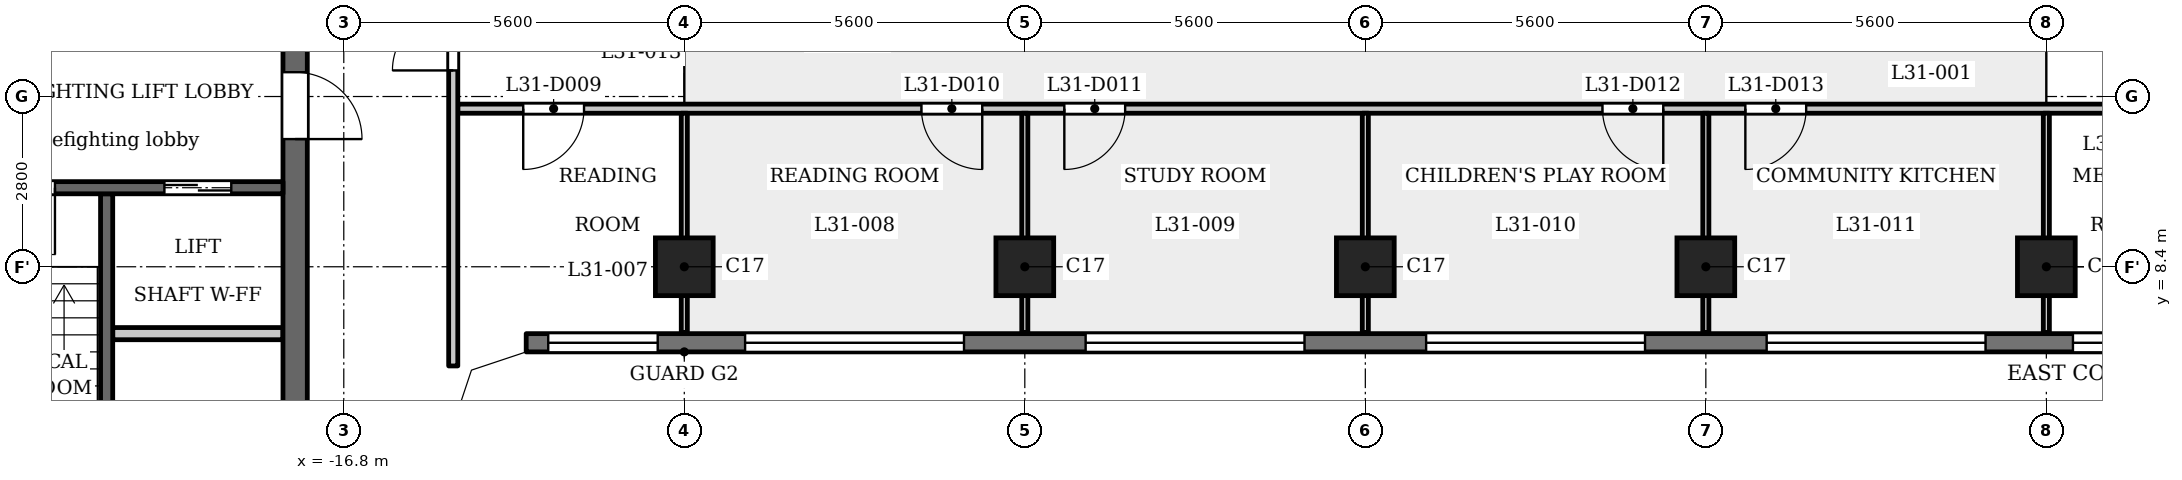
"""IFC4 building model, lengths in metres.
Left out: names, types, materials, properties, quantities, classifications, styles, units other than length and angle.
Written with IfcOpenShell. Run it as: python <this file> out.ifc"""

import sys

from ifc_helpers import new_model, si_unit, direction, frame, frame_2d, origin, origin_2d, place, context, subcontext, project, spatial, polyline, rectangle, outline, extrude, element, fill, save


model = new_model("IFC4")
c1 = context("Model", 3, precision=1e-05, world=origin(), true_north=direction((0.0, 1.0)))
c2 = subcontext(c1, "Body", "Model", "MODEL_VIEW")
j1 = project(units=[si_unit("LENGTHUNIT", "METRE"), si_unit("PLANEANGLEUNIT", "RADIAN")], contexts=[c1])
p1 = place(None, origin())
s1 = spatial("IfcSite", under=j1, at=p1, CompositionType="ELEMENT")
p2 = place(p1, origin())
s2 = spatial("IfcBuilding", under=s1, at=p2, CompositionType="ELEMENT")
p3 = place(p2, frame((0.0, 0.0, 121.8)))
s3 = spatial("IfcBuildingStorey", under=s2, at=p3, CompositionType="ELEMENT", Elevation=121.8)
for number, where, z_axis, x_axis in (
    (1, (-11.2, 8.4, 0.0), (0.0, 0.0, 1.0), (1.0, 0.0, 0.0)),
    (2, (-5.6, 8.4, 0.0), (0.0, 0.0, 1.0), (1.0, 0.0, 0.0)),
    (3, (0.0, 8.4, 0.0), (0.0, 0.0, 1.0), (1.0, 0.0, 0.0)),
    (4, (5.6, 8.4, 0.0), (0.0, 0.0, 1.0), (1.0, 0.0, 0.0)),
    (5, (11.2, 8.4, 0.0), (0.0, 0.0, 1.0), (1.0, 0.0, 0.0)),
):
    element("IfcColumn", number, at=place(p3, frame(where, z_axis=z_axis, x_axis=x_axis)), inside=s3, PredefinedType="COLUMN", context=c2, shape_type="SweptSolid", body=[
        extrude(rectangle(XDim=0.95, YDim=0.95, at=origin_2d()), origin(), (0.0, 0.0, 1.0), 3.5),
    ])
p4 = place(p3, frame((-13.8, 7.15, 0.0), z_axis=(0.0, 0.0, 1.0), x_axis=(1.0, 0.0, 0.0)))
e6 = element("IfcWall", 6, at=p4, inside=s3, PredefinedType="SOLIDWALL", context=c2, shape_type="SweptSolid", body=[
    extrude(rectangle(XDim=27.6, YDim=0.3, at=frame_2d((13.8, 0.0))), origin(), (0.0, 0.0, 1.0), 3.15),
])
p5 = place(p4, frame((0.363, 0.0, 0.9)))
e7 = element("IfcOpeningElement", 7, at=p5, cuts=e6, PredefinedType="OPENING", context=c2, shape_type="SweptSolid", body=[
    extrude(rectangle(XDim=1.8, YDim=1.25, at=frame_2d((0.9, 0.625))), frame((0.0, 0.16, 0.0), z_axis=(0.0, -1.0, 0.0), x_axis=(1.0, 0.0, 0.0)), (0.0, 0.0, 1.0), 0.32),
])
p6 = place(p4, frame((3.6, 0.0, 1.2)))
e8 = element("IfcOpeningElement", 8, at=p6, cuts=e6, PredefinedType="OPENING", context=c2, shape_type="SweptSolid", body=[
    extrude(rectangle(XDim=3.6, YDim=0.95, at=frame_2d((1.8, 0.475))), frame((0.0, 0.16, 0.0), z_axis=(0.0, -1.0, 0.0), x_axis=(1.0, 0.0, 0.0)), (0.0, 0.0, 1.0), 0.32),
])
p7 = place(p4, frame((9.2, 0.0, 1.2)))
e9 = element("IfcOpeningElement", 9, at=p7, cuts=e6, PredefinedType="OPENING", context=c2, shape_type="SweptSolid", body=[
    extrude(rectangle(XDim=3.6, YDim=0.95, at=frame_2d((1.8, 0.475))), frame((0.0, 0.16, 0.0), z_axis=(0.0, -1.0, 0.0), x_axis=(1.0, 0.0, 0.0)), (0.0, 0.0, 1.0), 0.32),
])
p8 = place(p4, frame((14.8, 0.0, 1.2)))
e10 = element("IfcOpeningElement", 10, at=p8, cuts=e6, PredefinedType="OPENING", context=c2, shape_type="SweptSolid", body=[
    extrude(rectangle(XDim=3.6, YDim=0.95, at=frame_2d((1.8, 0.475))), frame((0.0, 0.16, 0.0), z_axis=(0.0, -1.0, 0.0), x_axis=(1.0, 0.0, 0.0)), (0.0, 0.0, 1.0), 0.32),
])
p9 = place(p4, frame((20.4, 0.0, 1.2)))
e11 = element("IfcOpeningElement", 11, at=p9, cuts=e6, PredefinedType="OPENING", context=c2, shape_type="SweptSolid", body=[
    extrude(rectangle(XDim=3.6, YDim=0.95, at=frame_2d((1.8, 0.475))), frame((0.0, 0.16, 0.0), z_axis=(0.0, -1.0, 0.0), x_axis=(1.0, 0.0, 0.0)), (0.0, 0.0, 1.0), 0.32),
])
p10 = place(p4, frame((25.438, 0.0, 0.9)))
e12 = element("IfcOpeningElement", 12, at=p10, cuts=e6, PredefinedType="OPENING", context=c2, shape_type="SweptSolid", body=[
    extrude(rectangle(XDim=1.8, YDim=1.25, at=frame_2d((0.9, 0.625))), frame((0.0, 0.16, 0.0), z_axis=(0.0, -1.0, 0.0), x_axis=(1.0, 0.0, 0.0)), (0.0, 0.0, 1.0), 0.32),
])
p11 = place(p3, frame((-20.7, 2.6, 0.0), z_axis=(0.0, 0.0, 1.0), x_axis=(0.0, 1.0, 0.0)))
e13 = element("IfcWall", 13, at=p11, inside=s3, PredefinedType="SHEAR", context=c2, shape_type="SweptSolid", body=[
    extrude(rectangle(XDim=7.0, YDim=0.2, at=frame_2d((3.5, 0.0))), origin(), (0.0, 0.0, 1.0), 3.15),
])
p12 = place(p3, frame((-17.6, -12.3, 0.0), z_axis=(0.0, 0.0, 1.0), x_axis=(0.0, 1.0, 0.0)))
e14 = element("IfcWall", 14, at=p12, inside=s3, PredefinedType="SHEAR", context=c2, shape_type="SweptSolid", body=[
    extrude(rectangle(XDim=24.6, YDim=0.4, at=frame_2d((12.3, 0.0))), origin(), (0.0, 0.0, 1.0), 3.15),
])
p13 = place(p12, frame((6.0, 0.0, 0.0)))
e15 = element("IfcOpeningElement", 15, at=p13, cuts=e14, PredefinedType="OPENING", context=c2, shape_type="SweptSolid", body=[
    extrude(rectangle(XDim=1.1, YDim=2.1, at=frame_2d((0.55, 1.05))), frame((0.0, 0.21, 0.0), z_axis=(0.0, -1.0, 0.0), x_axis=(1.0, 0.0, 0.0)), (0.0, 0.0, 1.0), 0.42),
])
p14 = place(p12, frame((8.4, 0.0, 0.0)))
e16 = element("IfcOpeningElement", 16, at=p14, cuts=e14, PredefinedType="OPENING", context=c2, shape_type="SweptSolid", body=[
    extrude(rectangle(XDim=1.1, YDim=2.1, at=frame_2d((0.55, 1.05))), frame((0.0, 0.21, 0.0), z_axis=(0.0, -1.0, 0.0), x_axis=(1.0, 0.0, 0.0)), (0.0, 0.0, 1.0), 0.42),
])
p15 = place(p12, frame((10.8, 0.0, 0.0)))
e17 = element("IfcOpeningElement", 17, at=p15, cuts=e14, PredefinedType="OPENING", context=c2, shape_type="SweptSolid", body=[
    extrude(rectangle(XDim=1.1, YDim=2.1, at=frame_2d((0.55, 1.05))), frame((0.0, 0.21, 0.0), z_axis=(0.0, -1.0, 0.0), x_axis=(1.0, 0.0, 0.0)), (0.0, 0.0, 1.0), 0.42),
])
p16 = place(p12, frame((22.8, 0.0, 0.0)))
e18 = element("IfcOpeningElement", 18, at=p16, cuts=e14, PredefinedType="OPENING", context=c2, shape_type="SweptSolid", body=[
    extrude(rectangle(XDim=1.1, YDim=2.1, at=frame_2d((0.55, 1.05))), frame((0.0, 0.21, 0.0), z_axis=(0.0, -1.0, 0.0), x_axis=(1.0, 0.0, 0.0)), (0.0, 0.0, 1.0), 0.42),
])
p17 = place(p12, frame((0.7, 0.0, 0.0)))
e19 = element("IfcOpeningElement", 19, at=p17, cuts=e14, PredefinedType="OPENING", context=c2, shape_type="SweptSolid", body=[
    extrude(rectangle(XDim=1.1, YDim=2.1, at=frame_2d((0.55, 1.05))), frame((0.0, 0.21, 0.0), z_axis=(0.0, -1.0, 0.0), x_axis=(1.0, 0.0, 0.0)), (0.0, 0.0, 1.0), 0.42),
])
p18 = place(p12, frame((12.775, 0.0, 0.0)))
e20 = element("IfcOpeningElement", 20, at=p18, cuts=e14, PredefinedType="OPENING", context=c2, shape_type="SweptSolid", body=[
    extrude(rectangle(XDim=1.8, YDim=2.1, at=frame_2d((0.9, 1.05))), frame((0.0, 0.21, 0.0), z_axis=(0.0, -1.0, 0.0), x_axis=(1.0, 0.0, 0.0)), (0.0, 0.0, 1.0), 0.42),
])
p19 = place(p3, frame((-17.8, 7.3, 0.0), z_axis=(0.0, 0.0, 1.0), x_axis=(-1.0, 0.0, 0.0)))
e21 = element("IfcWall", 21, at=p19, inside=s3, PredefinedType="PARTITIONING", context=c2, shape_type="SweptSolid", body=[
    extrude(rectangle(XDim=2.8, YDim=0.2, at=frame_2d((1.4, 0.0))), origin(), (0.0, 0.0, 1.0), 3.15),
])
p20 = place(p3, frame((-17.8, 9.7, 0.0), z_axis=(0.0, 0.0, 1.0), x_axis=(-1.0, 0.0, 0.0)))
e22 = element("IfcWall", 22, at=p20, inside=s3, PredefinedType="SHEAR", context=c2, shape_type="SweptSolid", body=[
    extrude(rectangle(XDim=8.3, YDim=0.2, at=frame_2d((4.15, 0.0))), origin(), (0.0, 0.0, 1.0), 3.15),
])
p21 = place(p20, frame((0.85, 0.0, 0.0)))
e23 = element("IfcOpeningElement", 23, at=p21, cuts=e22, PredefinedType="OPENING", context=c2, shape_type="SweptSolid", body=[
    extrude(rectangle(XDim=1.1, YDim=2.1, at=frame_2d((0.55, 1.05))), frame((0.0, 0.11, 0.0), z_axis=(0.0, -1.0, 0.0), x_axis=(1.0, 0.0, 0.0)), (0.0, 0.0, 1.0), 0.22),
])
p22 = place(p20, frame((3.75, 0.0, 0.0)))
e24 = element("IfcOpeningElement", 24, at=p22, cuts=e22, PredefinedType="OPENING", context=c2, shape_type="SweptSolid", body=[
    extrude(rectangle(XDim=1.1, YDim=2.1, at=frame_2d((0.55, 1.05))), frame((0.0, 0.11, 0.0), z_axis=(0.0, -1.0, 0.0), x_axis=(1.0, 0.0, 0.0)), (0.0, 0.0, 1.0), 0.22),
])
p23 = place(p3, frame((-14.925, 11.0, 0.0), z_axis=(0.0, 0.0, 1.0), x_axis=(1.0, 0.0, 0.0)))
e25 = element("IfcWall", 25, at=p23, inside=s3, PredefinedType="PARTITIONING", context=c2, shape_type="SweptSolid", body=[
    extrude(rectangle(XDim=29.85, YDim=0.15, at=frame_2d((14.925, 0.0))), origin(), (0.0, 0.0, 1.0), 3.15),
])
p24 = place(p23, frame((1.076, 0.0, 0.0)))
e26 = element("IfcOpeningElement", 26, at=p24, cuts=e25, PredefinedType="OPENING", context=c2, shape_type="SweptSolid", body=[
    extrude(rectangle(XDim=1.0, YDim=2.1, at=frame_2d((0.5, 1.05))), frame((0.0, 0.085, 0.0), z_axis=(0.0, -1.0, 0.0), x_axis=(1.0, 0.0, 0.0)), (0.0, 0.0, 1.0), 0.17),
])
p25 = place(p23, frame((7.625, 0.0, 0.0)))
e27 = element("IfcOpeningElement", 27, at=p25, cuts=e25, PredefinedType="OPENING", context=c2, shape_type="SweptSolid", body=[
    extrude(rectangle(XDim=1.0, YDim=2.1, at=frame_2d((0.5, 1.05))), frame((0.0, 0.085, 0.0), z_axis=(0.0, -1.0, 0.0), x_axis=(1.0, 0.0, 0.0)), (0.0, 0.0, 1.0), 0.17),
])
p26 = place(p23, frame((9.975, 0.0, 0.0)))
e28 = element("IfcOpeningElement", 28, at=p26, cuts=e25, PredefinedType="OPENING", context=c2, shape_type="SweptSolid", body=[
    extrude(rectangle(XDim=1.0, YDim=2.1, at=frame_2d((0.5, 1.05))), frame((0.0, 0.085, 0.0), z_axis=(0.0, -1.0, 0.0), x_axis=(1.0, 0.0, 0.0)), (0.0, 0.0, 1.0), 0.17),
])
p27 = place(p23, frame((18.825, 0.0, 0.0)))
e29 = element("IfcOpeningElement", 29, at=p27, cuts=e25, PredefinedType="OPENING", context=c2, shape_type="SweptSolid", body=[
    extrude(rectangle(XDim=1.0, YDim=2.1, at=frame_2d((0.5, 1.05))), frame((0.0, 0.085, 0.0), z_axis=(0.0, -1.0, 0.0), x_axis=(1.0, 0.0, 0.0)), (0.0, 0.0, 1.0), 0.17),
])
p28 = place(p23, frame((21.175, 0.0, 0.0)))
e30 = element("IfcOpeningElement", 30, at=p28, cuts=e25, PredefinedType="OPENING", context=c2, shape_type="SweptSolid", body=[
    extrude(rectangle(XDim=1.0, YDim=2.1, at=frame_2d((0.5, 1.05))), frame((0.0, 0.085, 0.0), z_axis=(0.0, -1.0, 0.0), x_axis=(1.0, 0.0, 0.0)), (0.0, 0.0, 1.0), 0.17),
])
p29 = place(p23, frame((27.775, 0.0, 0.0)))
e31 = element("IfcOpeningElement", 31, at=p29, cuts=e25, PredefinedType="OPENING", context=c2, shape_type="SweptSolid", body=[
    extrude(rectangle(XDim=1.0, YDim=2.1, at=frame_2d((0.5, 1.05))), frame((0.0, 0.085, 0.0), z_axis=(0.0, -1.0, 0.0), x_axis=(1.0, 0.0, 0.0)), (0.0, 0.0, 1.0), 0.17),
])
p30 = place(p3, frame((-15.0, 6.769, 0.0), z_axis=(0.0, 0.0, 1.0), x_axis=(0.0, 1.0, 0.0)))
e32 = element("IfcWall", 32, at=p30, inside=s3, PredefinedType="PARTITIONING", context=c2, shape_type="SweptSolid", body=[
    extrude(rectangle(XDim=6.356, YDim=0.15, at=frame_2d((3.178, 0.0))), origin(), (0.0, 0.0, 1.0), 3.15),
])
p31 = place(p30, frame((4.86, 0.0, 0.0)))
e33 = element("IfcOpeningElement", 33, at=p31, cuts=e32, PredefinedType="OPENING", context=c2, shape_type="SweptSolid", body=[
    extrude(rectangle(XDim=1.0, YDim=2.1, at=frame_2d((0.5, 1.05))), frame((0.0, 0.085, 0.0), z_axis=(0.0, -1.0, 0.0), x_axis=(1.0, 0.0, 0.0)), (0.0, 0.0, 1.0), 0.17),
])
for number, where, z_axis, x_axis in (
    (34, (-11.2, 7.32, 0.0), (0.0, 0.0, 1.0), (0.0, 1.0, 0.0)),
    (35, (-5.6, 7.32, 0.0), (0.0, 0.0, 1.0), (0.0, 1.0, 0.0)),
    (36, (0.0, 7.32, 0.0), (0.0, 0.0, 1.0), (0.0, 1.0, 0.0)),
    (37, (5.6, 7.32, 0.0), (0.0, 0.0, 1.0), (0.0, 1.0, 0.0)),
    (38, (11.2, 7.32, 0.0), (0.0, 0.0, 1.0), (0.0, 1.0, 0.0)),
):
    element("IfcWall", number, at=place(p3, frame(where, z_axis=z_axis, x_axis=x_axis)), inside=s3, PredefinedType="PARTITIONING", context=c2, shape_type="SweptSolid", body=[
        extrude(rectangle(XDim=3.605, YDim=0.1, at=frame_2d((1.802, 0.0))), origin(), (0.0, 0.0, 1.0), 3.15),
    ])
p32 = place(p3, origin())
e39 = element("IfcWall", 39, at=p32, inside=s3, PredefinedType="SOLIDWALL", context=c2, shape_type="SweptSolid", body=[
    extrude(outline(polyline([(-13.849, 7.3), (-14.937, 6.937), (-15.3, 5.849), (-15.3, 5.8), (-15.0, 5.8), (-14.7, 6.7), (-13.8, 7.0), (-13.8, 7.3), (-13.849, 7.3)])), origin(), (0.0, 0.0, 1.0), 3.15),
])
p33 = place(p21, origin())
e40 = element("IfcDoor", 40, at=p33, inside=s3, OperationType="DOUBLE_DOOR_SLIDING", PredefinedType="DOOR", context=c2, shape_type="SweptSolid", body=[
    extrude(rectangle(XDim=1.1, YDim=2.1, at=frame_2d((0.55, 1.05))), frame((0.0, 0.025, 0.0), z_axis=(0.0, -1.0, 0.0), x_axis=(1.0, 0.0, 0.0)), (0.0, 0.0, 1.0), 0.05),
])
fill(e23, e40)
p34 = place(p16, origin())
e41 = element("IfcDoor", 41, at=p34, inside=s3, OperationType="SINGLE_SWING_LEFT", PredefinedType="DOOR", context=c2, shape_type="SweptSolid", body=[
    extrude(rectangle(XDim=1.1, YDim=2.1, at=frame_2d((0.55, 1.05))), frame((0.0, 0.025, 0.0), z_axis=(0.0, -1.0, 0.0), x_axis=(1.0, 0.0, 0.0)), (0.0, 0.0, 1.0), 0.05),
])
fill(e18, e41)
p35 = place(p22, origin())
e42 = element("IfcDoor", 42, at=p35, inside=s3, OperationType="SINGLE_SWING_RIGHT", PredefinedType="DOOR", context=c2, shape_type="SweptSolid", body=[
    extrude(rectangle(XDim=1.1, YDim=2.1, at=frame_2d((0.55, 1.05))), frame((0.0, 0.025, 0.0), z_axis=(0.0, -1.0, 0.0), x_axis=(1.0, 0.0, 0.0)), (0.0, 0.0, 1.0), 0.05),
])
fill(e24, e42)
p36 = place(p31, origin())
e43 = element("IfcDoor", 43, at=p36, inside=s3, OperationType="SINGLE_SWING_RIGHT", PredefinedType="DOOR", context=c2, shape_type="SweptSolid", body=[
    extrude(rectangle(XDim=1.0, YDim=2.1, at=frame_2d((0.5, 1.05))), frame((0.0, 0.025, 0.0), z_axis=(0.0, -1.0, 0.0), x_axis=(1.0, 0.0, 0.0)), (0.0, 0.0, 1.0), 0.05),
])
fill(e33, e43)
p37 = place(p24, origin())
e44 = element("IfcDoor", 44, at=p37, inside=s3, OperationType="SINGLE_SWING_LEFT", PredefinedType="DOOR", context=c2, shape_type="SweptSolid", body=[
    extrude(rectangle(XDim=1.0, YDim=2.1, at=frame_2d((0.5, 1.05))), frame((0.0, 0.025, 0.0), z_axis=(0.0, -1.0, 0.0), x_axis=(1.0, 0.0, 0.0)), (0.0, 0.0, 1.0), 0.05),
])
fill(e26, e44)
p38 = place(p25, origin())
e45 = element("IfcDoor", 45, at=p38, inside=s3, OperationType="SINGLE_SWING_RIGHT", PredefinedType="DOOR", context=c2, shape_type="SweptSolid", body=[
    extrude(rectangle(XDim=1.0, YDim=2.1, at=frame_2d((0.5, 1.05))), frame((0.0, 0.025, 0.0), z_axis=(0.0, -1.0, 0.0), x_axis=(1.0, 0.0, 0.0)), (0.0, 0.0, 1.0), 0.05),
])
fill(e27, e45)
p39 = place(p26, origin())
e46 = element("IfcDoor", 46, at=p39, inside=s3, OperationType="SINGLE_SWING_LEFT", PredefinedType="DOOR", context=c2, shape_type="SweptSolid", body=[
    extrude(rectangle(XDim=1.0, YDim=2.1, at=frame_2d((0.5, 1.05))), frame((0.0, 0.025, 0.0), z_axis=(0.0, -1.0, 0.0), x_axis=(1.0, 0.0, 0.0)), (0.0, 0.0, 1.0), 0.05),
])
fill(e28, e46)
p40 = place(p27, origin())
e47 = element("IfcDoor", 47, at=p40, inside=s3, OperationType="SINGLE_SWING_RIGHT", PredefinedType="DOOR", context=c2, shape_type="SweptSolid", body=[
    extrude(rectangle(XDim=1.0, YDim=2.1, at=frame_2d((0.5, 1.05))), frame((0.0, 0.025, 0.0), z_axis=(0.0, -1.0, 0.0), x_axis=(1.0, 0.0, 0.0)), (0.0, 0.0, 1.0), 0.05),
])
fill(e29, e47)
p41 = place(p28, origin())
e48 = element("IfcDoor", 48, at=p41, inside=s3, OperationType="SINGLE_SWING_LEFT", PredefinedType="DOOR", context=c2, shape_type="SweptSolid", body=[
    extrude(rectangle(XDim=1.0, YDim=2.1, at=frame_2d((0.5, 1.05))), frame((0.0, 0.025, 0.0), z_axis=(0.0, -1.0, 0.0), x_axis=(1.0, 0.0, 0.0)), (0.0, 0.0, 1.0), 0.05),
])
fill(e30, e48)
p42 = place(p5, origin())
e49 = element("IfcWindow", 49, at=p42, inside=s3, PartitioningType="SINGLE_PANEL", PredefinedType="WINDOW", context=c2, shape_type="SweptSolid", body=[
    extrude(rectangle(XDim=1.8, YDim=1.25, at=frame_2d((0.9, 0.625))), frame((0.0, 0.03, 0.0), z_axis=(0.0, -1.0, 0.0), x_axis=(1.0, 0.0, 0.0)), (0.0, 0.0, 1.0), 0.06),
])
fill(e7, e49)
p43 = place(p6, origin())
e50 = element("IfcWindow", 50, at=p43, inside=s3, PartitioningType="SINGLE_PANEL", PredefinedType="WINDOW", context=c2, shape_type="SweptSolid", body=[
    extrude(rectangle(XDim=3.6, YDim=0.95, at=frame_2d((1.8, 0.475))), frame((0.0, 0.03, 0.0), z_axis=(0.0, -1.0, 0.0), x_axis=(1.0, 0.0, 0.0)), (0.0, 0.0, 1.0), 0.06),
])
fill(e8, e50)
p44 = place(p7, origin())
e51 = element("IfcWindow", 51, at=p44, inside=s3, PartitioningType="SINGLE_PANEL", PredefinedType="WINDOW", context=c2, shape_type="SweptSolid", body=[
    extrude(rectangle(XDim=3.6, YDim=0.95, at=frame_2d((1.8, 0.475))), frame((0.0, 0.03, 0.0), z_axis=(0.0, -1.0, 0.0), x_axis=(1.0, 0.0, 0.0)), (0.0, 0.0, 1.0), 0.06),
])
fill(e9, e51)
p45 = place(p8, origin())
e52 = element("IfcWindow", 52, at=p45, inside=s3, PartitioningType="SINGLE_PANEL", PredefinedType="WINDOW", context=c2, shape_type="SweptSolid", body=[
    extrude(rectangle(XDim=3.6, YDim=0.95, at=frame_2d((1.8, 0.475))), frame((0.0, 0.03, 0.0), z_axis=(0.0, -1.0, 0.0), x_axis=(1.0, 0.0, 0.0)), (0.0, 0.0, 1.0), 0.06),
])
fill(e10, e52)
p46 = place(p9, origin())
e53 = element("IfcWindow", 53, at=p46, inside=s3, PartitioningType="SINGLE_PANEL", PredefinedType="WINDOW", context=c2, shape_type="SweptSolid", body=[
    extrude(rectangle(XDim=3.6, YDim=0.95, at=frame_2d((1.8, 0.475))), frame((0.0, 0.03, 0.0), z_axis=(0.0, -1.0, 0.0), x_axis=(1.0, 0.0, 0.0)), (0.0, 0.0, 1.0), 0.06),
])
fill(e11, e53)
p47 = place(p10, origin())
e54 = element("IfcWindow", 54, at=p47, inside=s3, PartitioningType="SINGLE_PANEL", PredefinedType="WINDOW", context=c2, shape_type="SweptSolid", body=[
    extrude(rectangle(XDim=1.8, YDim=1.25, at=frame_2d((0.9, 0.625))), frame((0.0, 0.03, 0.0), z_axis=(0.0, -1.0, 0.0), x_axis=(1.0, 0.0, 0.0)), (0.0, 0.0, 1.0), 0.06),
])
fill(e12, e54)
save(model, sys.argv[1])
